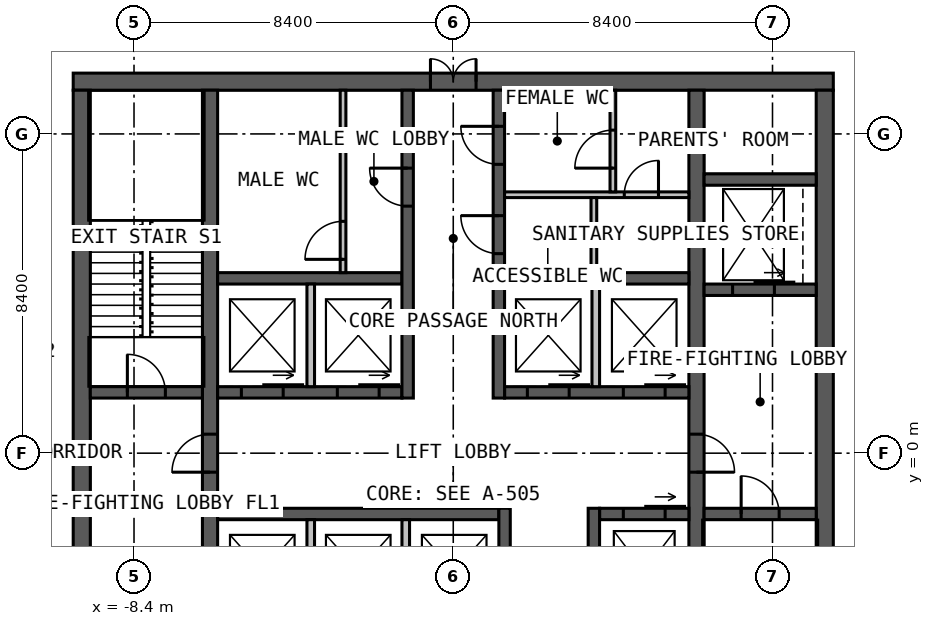
"""IFC4 building model, lengths in metres.
Left out: names, types, materials, properties, quantities, classifications, styles, units other than length and angle.
Written with IfcOpenShell. Run it as: python <this file> out.ifc"""

import sys

from ifc_helpers import new_model, si_unit, direction, frame, frame_2d, origin, place, context, subcontext, project, spatial, rectangle, extrude, element, fill, save


model = new_model("IFC4")
c1 = context("Model", 3, precision=1e-05, world=origin(), true_north=direction((0.0, 1.0)))
c2 = subcontext(c1, "Body", "Model", "MODEL_VIEW")
j1 = project(units=[si_unit("LENGTHUNIT", "METRE"), si_unit("PLANEANGLEUNIT", "RADIAN")], contexts=[c1])
p1 = place(None, origin())
s1 = spatial("IfcSite", under=j1, at=p1, CompositionType="ELEMENT")
p2 = place(p1, origin())
s2 = spatial("IfcBuilding", under=s1, at=p2, CompositionType="ELEMENT")
p3 = place(p2, frame((0.0, 0.0, 191.0)))
s3 = spatial("IfcBuildingStorey", under=s2, at=p3, CompositionType="ELEMENT", Elevation=191.0)
p4 = place(p3, frame((-10.0, 9.775, 0.0), z_axis=(0.0, 0.0, 1.0), x_axis=(1.0, 0.0, 0.0)))
e1 = element("IfcWall", 1, at=p4, inside=s3, PredefinedType="SOLIDWALL", context=c2, shape_type="SweptSolid", body=[
    extrude(rectangle(XDim=20.0, YDim=0.45, at=frame_2d((10.0, 0.0))), origin(), (0.0, 0.0, 1.0), 4.0),
])
p5 = place(p4, frame((9.4, 0.0, 0.0)))
e2 = element("IfcOpeningElement", 2, at=p5, cuts=e1, PredefinedType="OPENING", context=c2, shape_type="SweptSolid", body=[
    extrude(rectangle(XDim=1.2, YDim=2.2, at=frame_2d((0.6, 1.1))), frame((0.0, 0.235, 0.0), z_axis=(0.0, -1.0, 0.0), x_axis=(1.0, 0.0, 0.0)), (0.0, 0.0, 1.0), 0.47),
])
for number, where, z_axis, x_axis in (
    (3, (9.775, -9.55, 0.0), (0.0, 0.0, 1.0), (0.0, 1.0, 0.0)),
    (4, (-9.775, 9.55, 0.0), (0.0, 0.0, 1.0), (0.0, -1.0, 0.0)),
):
    element("IfcWall", number, at=place(p3, frame(where, z_axis=z_axis, x_axis=x_axis)), inside=s3, PredefinedType="SOLIDWALL", context=c2, shape_type="SweptSolid", body=[
        extrude(rectangle(XDim=19.1, YDim=0.45, at=frame_2d((9.55, 0.0))), origin(), (0.0, 0.0, 1.0), 4.0),
    ])
p6 = place(p3, frame((-6.4, -9.55, 0.0), z_axis=(0.0, 0.0, 1.0), x_axis=(0.0, 1.0, 0.0)))
e5 = element("IfcWall", 5, at=p6, inside=s3, PredefinedType="SOLIDWALL", context=c2, shape_type="SweptSolid", body=[
    extrude(rectangle(XDim=19.1, YDim=0.4, at=frame_2d((9.55, 0.0))), origin(), (0.0, 0.0, 1.0), 4.0),
])
p7 = place(p6, frame((9.05, 0.0, 0.0)))
e6 = element("IfcOpeningElement", 6, at=p7, cuts=e5, PredefinedType="OPENING", context=c2, shape_type="SweptSolid", body=[
    extrude(rectangle(XDim=1.0, YDim=2.2, at=frame_2d((0.5, 1.1))), frame((0.0, 0.21, 0.0), z_axis=(0.0, -1.0, 0.0), x_axis=(1.0, 0.0, 0.0)), (0.0, 0.0, 1.0), 0.42),
])
p8 = place(p3, frame((6.4, 9.55, 0.0), z_axis=(0.0, 0.0, 1.0), x_axis=(0.0, -1.0, 0.0)))
e7 = element("IfcWall", 7, at=p8, inside=s3, PredefinedType="SOLIDWALL", context=c2, shape_type="SweptSolid", body=[
    extrude(rectangle(XDim=19.1, YDim=0.4, at=frame_2d((9.55, 0.0))), origin(), (0.0, 0.0, 1.0), 4.0),
])
p9 = place(p8, frame((9.05, 0.0, 0.0)))
e8 = element("IfcOpeningElement", 8, at=p9, cuts=e7, PredefinedType="OPENING", context=c2, shape_type="SweptSolid", body=[
    extrude(rectangle(XDim=1.0, YDim=2.2, at=frame_2d((0.5, 1.1))), frame((0.0, 0.21, 0.0), z_axis=(0.0, -1.0, 0.0), x_axis=(1.0, 0.0, 0.0)), (0.0, 0.0, 1.0), 0.42),
])
p10 = place(p3, frame((-6.2, 1.6, 0.0), z_axis=(0.0, 0.0, 1.0), x_axis=(1.0, 0.0, 0.0)))
e9 = element("IfcWall", 9, at=p10, inside=s3, PredefinedType="SOLIDWALL", context=c2, shape_type="SweptSolid", body=[
    extrude(rectangle(XDim=4.85, YDim=0.3, at=frame_2d((2.425, 0.0))), origin(), (0.0, 0.0, 1.0), 4.0),
])
p11 = place(p10, frame((0.625, 0.0, 0.0)))
e10 = element("IfcOpeningElement", 10, at=p11, cuts=e9, PredefinedType="OPENING", context=c2, shape_type="SweptSolid", body=[
    extrude(rectangle(XDim=1.1, YDim=2.2, at=frame_2d((0.55, 1.1))), frame((0.0, 0.16, 0.0), z_axis=(0.0, -1.0, 0.0), x_axis=(1.0, 0.0, 0.0)), (0.0, 0.0, 1.0), 0.32),
])
p12 = place(p10, frame((3.15, 0.0, 0.0)))
e11 = element("IfcOpeningElement", 11, at=p12, cuts=e9, PredefinedType="OPENING", context=c2, shape_type="SweptSolid", body=[
    extrude(rectangle(XDim=1.1, YDim=2.2, at=frame_2d((0.55, 1.1))), frame((0.0, 0.16, 0.0), z_axis=(0.0, -1.0, 0.0), x_axis=(1.0, 0.0, 0.0)), (0.0, 0.0, 1.0), 0.32),
])
p13 = place(p3, frame((1.35, 1.6, 0.0), z_axis=(0.0, 0.0, 1.0), x_axis=(1.0, 0.0, 0.0)))
e12 = element("IfcWall", 12, at=p13, inside=s3, PredefinedType="SOLIDWALL", context=c2, shape_type="SweptSolid", body=[
    extrude(rectangle(XDim=4.85, YDim=0.3, at=frame_2d((2.425, 0.0))), origin(), (0.0, 0.0, 1.0), 4.0),
])
p14 = place(p13, frame((0.6, 0.0, 0.0)))
e13 = element("IfcOpeningElement", 13, at=p14, cuts=e12, PredefinedType="OPENING", context=c2, shape_type="SweptSolid", body=[
    extrude(rectangle(XDim=1.1, YDim=2.2, at=frame_2d((0.55, 1.1))), frame((0.0, 0.16, 0.0), z_axis=(0.0, -1.0, 0.0), x_axis=(1.0, 0.0, 0.0)), (0.0, 0.0, 1.0), 0.32),
])
p15 = place(p13, frame((3.125, 0.0, 0.0)))
e14 = element("IfcOpeningElement", 14, at=p15, cuts=e12, PredefinedType="OPENING", context=c2, shape_type="SweptSolid", body=[
    extrude(rectangle(XDim=1.1, YDim=2.2, at=frame_2d((0.55, 1.1))), frame((0.0, 0.16, 0.0), z_axis=(0.0, -1.0, 0.0), x_axis=(1.0, 0.0, 0.0)), (0.0, 0.0, 1.0), 0.32),
])
for number, where, z_axis, x_axis in (
    (15, (-6.2, 4.6, 0.0), (0.0, 0.0, 1.0), (1.0, 0.0, 0.0)),
    (16, (1.35, 4.6, 0.0), (0.0, 0.0, 1.0), (1.0, 0.0, 0.0)),
):
    element("IfcWall", number, at=place(p3, frame(where, z_axis=z_axis, x_axis=x_axis)), inside=s3, PredefinedType="SOLIDWALL", context=c2, shape_type="SweptSolid", body=[
        extrude(rectangle(XDim=4.85, YDim=0.3, at=frame_2d((2.425, 0.0))), origin(), (0.0, 0.0, 1.0), 4.0),
    ])
p16 = place(p3, frame((-1.2, 1.45, 0.0), z_axis=(0.0, 0.0, 1.0), x_axis=(0.0, 1.0, 0.0)))
e17 = element("IfcWall", 17, at=p16, inside=s3, PredefinedType="SOLIDWALL", context=c2, shape_type="SweptSolid", body=[
    extrude(rectangle(XDim=8.1, YDim=0.3, at=frame_2d((4.05, 0.0))), origin(), (0.0, 0.0, 1.0), 4.0),
])
p17 = place(p16, frame((5.05, 0.0, 0.0)))
e18 = element("IfcOpeningElement", 18, at=p17, cuts=e17, PredefinedType="OPENING", context=c2, shape_type="SweptSolid", body=[
    extrude(rectangle(XDim=1.0, YDim=2.2, at=frame_2d((0.5, 1.1))), frame((0.0, 0.16, 0.0), z_axis=(0.0, -1.0, 0.0), x_axis=(1.0, 0.0, 0.0)), (0.0, 0.0, 1.0), 0.32),
])
p18 = place(p3, frame((1.2, 1.45, 0.0), z_axis=(0.0, 0.0, 1.0), x_axis=(0.0, 1.0, 0.0)))
e19 = element("IfcWall", 19, at=p18, inside=s3, PredefinedType="SOLIDWALL", context=c2, shape_type="SweptSolid", body=[
    extrude(rectangle(XDim=8.1, YDim=0.3, at=frame_2d((4.05, 0.0))), origin(), (0.0, 0.0, 1.0), 4.0),
])
p19 = place(p18, frame((3.8, 0.0, 0.0)))
e20 = element("IfcOpeningElement", 20, at=p19, cuts=e19, PredefinedType="OPENING", context=c2, shape_type="SweptSolid", body=[
    extrude(rectangle(XDim=1.0, YDim=2.2, at=frame_2d((0.5, 1.1))), frame((0.0, 0.16, 0.0), z_axis=(0.0, -1.0, 0.0), x_axis=(1.0, 0.0, 0.0)), (0.0, 0.0, 1.0), 0.32),
])
p20 = place(p18, frame((6.15, 0.0, 0.0)))
e21 = element("IfcOpeningElement", 21, at=p20, cuts=e19, PredefinedType="OPENING", context=c2, shape_type="SweptSolid", body=[
    extrude(rectangle(XDim=1.0, YDim=2.2, at=frame_2d((0.5, 1.1))), frame((0.0, 0.16, 0.0), z_axis=(0.0, -1.0, 0.0), x_axis=(1.0, 0.0, 0.0)), (0.0, 0.0, 1.0), 0.32),
])
p21 = place(p3, frame((-6.2, -1.6, 0.0), z_axis=(0.0, 0.0, 1.0), x_axis=(1.0, 0.0, 0.0)))
e22 = element("IfcWall", 22, at=p21, inside=s3, PredefinedType="SOLIDWALL", context=c2, shape_type="SweptSolid", body=[
    extrude(rectangle(XDim=7.4, YDim=0.3, at=frame_2d((3.7, 0.0))), origin(), (0.0, 0.0, 1.0), 4.0),
])
p22 = place(p3, frame((3.85, -1.6, 0.0), z_axis=(0.0, 0.0, 1.0), x_axis=(1.0, 0.0, 0.0)))
e23 = element("IfcWall", 23, at=p22, inside=s3, PredefinedType="SOLIDWALL", context=c2, shape_type="SweptSolid", body=[
    extrude(rectangle(XDim=2.35, YDim=0.3, at=frame_2d((1.175, 0.0))), origin(), (0.0, 0.0, 1.0), 4.0),
])
p23 = place(p22, frame((0.625, 0.0, 0.0)))
e24 = element("IfcOpeningElement", 24, at=p23, cuts=e23, PredefinedType="OPENING", context=c2, shape_type="SweptSolid", body=[
    extrude(rectangle(XDim=1.1, YDim=2.2, at=frame_2d((0.55, 1.1))), frame((0.0, 0.16, 0.0), z_axis=(0.0, -1.0, 0.0), x_axis=(1.0, 0.0, 0.0)), (0.0, 0.0, 1.0), 0.32),
])
p24 = place(p3, frame((1.35, -1.45, 0.0), z_axis=(0.0, 0.0, 1.0), x_axis=(0.0, -1.0, 0.0)))
e25 = element("IfcWall", 25, at=p24, inside=s3, PredefinedType="SOLIDWALL", context=c2, shape_type="SweptSolid", body=[
    extrude(rectangle(XDim=8.1, YDim=0.3, at=frame_2d((4.05, 0.0))), origin(), (0.0, 0.0, 1.0), 4.0),
])
p25 = place(p24, frame((5.975, 0.0, 0.0)))
e26 = element("IfcOpeningElement", 26, at=p25, cuts=e25, PredefinedType="OPENING", context=c2, shape_type="SweptSolid", body=[
    extrude(rectangle(XDim=1.0, YDim=2.2, at=frame_2d((0.5, 1.1))), frame((0.0, 0.16, 0.0), z_axis=(0.0, -1.0, 0.0), x_axis=(1.0, 0.0, 0.0)), (0.0, 0.0, 1.0), 0.32),
])
p26 = place(p24, frame((3.525, 0.0, 0.0)))
e27 = element("IfcOpeningElement", 27, at=p26, cuts=e25, PredefinedType="OPENING", context=c2, shape_type="SweptSolid", body=[
    extrude(rectangle(XDim=0.9, YDim=2.2, at=frame_2d((0.45, 1.1))), frame((0.0, 0.16, 0.0), z_axis=(0.0, -1.0, 0.0), x_axis=(1.0, 0.0, 0.0)), (0.0, 0.0, 1.0), 0.32),
])
p27 = place(p3, frame((3.7, -1.45, 0.0), z_axis=(0.0, 0.0, 1.0), x_axis=(0.0, -1.0, 0.0)))
e28 = element("IfcWall", 28, at=p27, inside=s3, PredefinedType="SOLIDWALL", context=c2, shape_type="SweptSolid", body=[
    extrude(rectangle(XDim=8.1, YDim=0.3, at=frame_2d((4.05, 0.0))), origin(), (0.0, 0.0, 1.0), 4.0),
])
p28 = place(p27, frame((5.1, 0.0, 0.0)))
e29 = element("IfcOpeningElement", 29, at=p28, cuts=e28, PredefinedType="OPENING", context=c2, shape_type="SweptSolid", body=[
    extrude(rectangle(XDim=0.9, YDim=2.2, at=frame_2d((0.45, 1.1))), frame((0.0, 0.16, 0.0), z_axis=(0.0, -1.0, 0.0), x_axis=(1.0, 0.0, 0.0)), (0.0, 0.0, 1.0), 0.32),
])
p29 = place(p3, frame((-9.55, 1.6, 0.0), z_axis=(0.0, 0.0, 1.0), x_axis=(1.0, 0.0, 0.0)))
e30 = element("IfcWall", 30, at=p29, inside=s3, PredefinedType="SOLIDWALL", context=c2, shape_type="SweptSolid", body=[
    extrude(rectangle(XDim=2.95, YDim=0.3, at=frame_2d((1.475, 0.0))), origin(), (0.0, 0.0, 1.0), 4.0),
])
p30 = place(p29, frame((0.975, 0.0, 0.0)))
e31 = element("IfcOpeningElement", 31, at=p30, cuts=e30, PredefinedType="OPENING", context=c2, shape_type="SweptSolid", body=[
    extrude(rectangle(XDim=1.0, YDim=2.2, at=frame_2d((0.5, 1.1))), frame((0.0, 0.16, 0.0), z_axis=(0.0, -1.0, 0.0), x_axis=(1.0, 0.0, 0.0)), (0.0, 0.0, 1.0), 0.32),
])
p31 = place(p3, frame((6.6, -1.6, 0.0), z_axis=(0.0, 0.0, 1.0), x_axis=(1.0, 0.0, 0.0)))
e32 = element("IfcWall", 32, at=p31, inside=s3, PredefinedType="SOLIDWALL", context=c2, shape_type="SweptSolid", body=[
    extrude(rectangle(XDim=2.95, YDim=0.3, at=frame_2d((1.475, 0.0))), origin(), (0.0, 0.0, 1.0), 4.0),
])
p32 = place(p31, frame((0.975, 0.0, 0.0)))
e33 = element("IfcOpeningElement", 33, at=p32, cuts=e32, PredefinedType="OPENING", context=c2, shape_type="SweptSolid", body=[
    extrude(rectangle(XDim=1.0, YDim=2.2, at=frame_2d((0.5, 1.1))), frame((0.0, 0.16, 0.0), z_axis=(0.0, -1.0, 0.0), x_axis=(1.0, 0.0, 0.0)), (0.0, 0.0, 1.0), 0.32),
])
p33 = place(p3, frame((6.6, 4.3, 0.0), z_axis=(0.0, 0.0, 1.0), x_axis=(1.0, 0.0, 0.0)))
e34 = element("IfcWall", 34, at=p33, inside=s3, PredefinedType="SOLIDWALL", context=c2, shape_type="SweptSolid", body=[
    extrude(rectangle(XDim=2.95, YDim=0.3, at=frame_2d((1.475, 0.0))), origin(), (0.0, 0.0, 1.0), 4.0),
])
p34 = place(p33, frame((0.75, 0.0, 0.0)))
e35 = element("IfcOpeningElement", 35, at=p34, cuts=e34, PredefinedType="OPENING", context=c2, shape_type="SweptSolid", body=[
    extrude(rectangle(XDim=1.1, YDim=2.2, at=frame_2d((0.55, 1.1))), frame((0.0, 0.16, 0.0), z_axis=(0.0, -1.0, 0.0), x_axis=(1.0, 0.0, 0.0)), (0.0, 0.0, 1.0), 0.32),
])
p35 = place(p3, frame((6.6, 7.2, 0.0), z_axis=(0.0, 0.0, 1.0), x_axis=(1.0, 0.0, 0.0)))
e36 = element("IfcWall", 36, at=p35, inside=s3, PredefinedType="SOLIDWALL", context=c2, shape_type="SweptSolid", body=[
    extrude(rectangle(XDim=2.95, YDim=0.3, at=frame_2d((1.475, 0.0))), origin(), (0.0, 0.0, 1.0), 4.0),
])
for number, where, z_axis, x_axis in (
    (37, (-3.75, 1.75, 0.0), (0.0, 0.0, 1.0), (0.0, 1.0, 0.0)),
    (38, (3.75, 1.75, 0.0), (0.0, 0.0, 1.0), (0.0, 1.0, 0.0)),
    (39, (-3.75, -1.75, 0.0), (0.0, 0.0, 1.0), (0.0, -1.0, 0.0)),
    (40, (-1.25, -1.75, 0.0), (0.0, 0.0, 1.0), (0.0, -1.0, 0.0)),
):
    element("IfcWall", number, at=place(p3, frame(where, z_axis=z_axis, x_axis=x_axis)), inside=s3, PredefinedType="SOLIDWALL", context=c2, shape_type="SweptSolid", body=[
        extrude(rectangle(XDim=2.7, YDim=0.2, at=frame_2d((1.35, 0.0))), origin(), (0.0, 0.0, 1.0), 3.75),
    ])
p36 = place(p3, frame((1.35, 6.8, 0.0), z_axis=(0.0, 0.0, 1.0), x_axis=(1.0, 0.0, 0.0)))
e41 = element("IfcWall", 41, at=p36, inside=s3, PredefinedType="PARTITIONING", context=c2, shape_type="SweptSolid", body=[
    extrude(rectangle(XDim=4.85, YDim=0.15, at=frame_2d((2.425, 0.0))), origin(), (0.0, 0.0, 1.0), 3.75),
])
p37 = place(p36, frame((3.15, 0.0, 0.0)))
e42 = element("IfcOpeningElement", 42, at=p37, cuts=e41, PredefinedType="OPENING", context=c2, shape_type="SweptSolid", body=[
    extrude(rectangle(XDim=0.9, YDim=2.2, at=frame_2d((0.45, 1.1))), frame((0.0, 0.085, 0.0), z_axis=(0.0, -1.0, 0.0), x_axis=(1.0, 0.0, 0.0)), (0.0, 0.0, 1.0), 0.17),
])
p38 = place(p3, frame((3.7, 4.75, 0.0), z_axis=(0.0, 0.0, 1.0), x_axis=(0.0, 1.0, 0.0)))
e43 = element("IfcWall", 43, at=p38, inside=s3, PredefinedType="PARTITIONING", context=c2, shape_type="SweptSolid", body=[
    extrude(rectangle(XDim=1.975, YDim=0.15, at=frame_2d((0.988, 0.0))), origin(), (0.0, 0.0, 1.0), 3.75),
])
p39 = place(p3, frame((4.2, 6.875, 0.0), z_axis=(0.0, 0.0, 1.0), x_axis=(0.0, 1.0, 0.0)))
e44 = element("IfcWall", 44, at=p39, inside=s3, PredefinedType="PARTITIONING", context=c2, shape_type="SweptSolid", body=[
    extrude(rectangle(XDim=2.675, YDim=0.15, at=frame_2d((1.337, 0.0))), origin(), (0.0, 0.0, 1.0), 3.75),
])
p40 = place(p39, frame((0.625, 0.0, 0.0)))
e45 = element("IfcOpeningElement", 45, at=p40, cuts=e44, PredefinedType="OPENING", context=c2, shape_type="SweptSolid", body=[
    extrude(rectangle(XDim=1.0, YDim=2.2, at=frame_2d((0.5, 1.1))), frame((0.0, 0.085, 0.0), z_axis=(0.0, -1.0, 0.0), x_axis=(1.0, 0.0, 0.0)), (0.0, 0.0, 1.0), 0.17),
])
p41 = place(p3, frame((-2.9, 4.75, 0.0), z_axis=(0.0, 0.0, 1.0), x_axis=(0.0, 1.0, 0.0)))
e46 = element("IfcWall", 46, at=p41, inside=s3, PredefinedType="PARTITIONING", context=c2, shape_type="SweptSolid", body=[
    extrude(rectangle(XDim=4.8, YDim=0.15, at=frame_2d((2.4, 0.0))), origin(), (0.0, 0.0, 1.0), 3.75),
])
p42 = place(p41, frame((0.35, 0.0, 0.0)))
e47 = element("IfcOpeningElement", 47, at=p42, cuts=e46, PredefinedType="OPENING", context=c2, shape_type="SweptSolid", body=[
    extrude(rectangle(XDim=1.0, YDim=2.2, at=frame_2d((0.5, 1.1))), frame((0.0, 0.085, 0.0), z_axis=(0.0, -1.0, 0.0), x_axis=(1.0, 0.0, 0.0)), (0.0, 0.0, 1.0), 0.17),
])
p43 = place(p5, origin())
e48 = element("IfcDoor", 48, at=p43, inside=s3, OperationType="DOUBLE_DOOR_SINGLE_SWING", PredefinedType="DOOR", context=c2, shape_type="SweptSolid", body=[
    extrude(rectangle(XDim=1.2, YDim=2.2, at=frame_2d((0.6, 1.1))), frame((0.0, 0.025, 0.0), z_axis=(0.0, -1.0, 0.0), x_axis=(1.0, 0.0, 0.0)), (0.0, 0.0, 1.0), 0.05),
])
fill(e2, e48)
p44 = place(p7, origin())
e49 = element("IfcDoor", 49, at=p44, inside=s3, OperationType="SINGLE_SWING_LEFT", PredefinedType="DOOR", context=c2, shape_type="SweptSolid", body=[
    extrude(rectangle(XDim=1.0, YDim=2.2, at=frame_2d((0.5, 1.1))), frame((0.0, 0.025, 0.0), z_axis=(0.0, -1.0, 0.0), x_axis=(1.0, 0.0, 0.0)), (0.0, 0.0, 1.0), 0.05),
])
fill(e6, e49)
p45 = place(p9, origin())
e50 = element("IfcDoor", 50, at=p45, inside=s3, OperationType="SINGLE_SWING_RIGHT", PredefinedType="DOOR", context=c2, shape_type="SweptSolid", body=[
    extrude(rectangle(XDim=1.0, YDim=2.2, at=frame_2d((0.5, 1.1))), frame((0.0, 0.025, 0.0), z_axis=(0.0, -1.0, 0.0), x_axis=(1.0, 0.0, 0.0)), (0.0, 0.0, 1.0), 0.05),
])
fill(e8, e50)
p46 = place(p30, origin())
e51 = element("IfcDoor", 51, at=p46, inside=s3, OperationType="SINGLE_SWING_LEFT", PredefinedType="DOOR", context=c2, shape_type="SweptSolid", body=[
    extrude(rectangle(XDim=1.0, YDim=2.2, at=frame_2d((0.5, 1.1))), frame((0.0, 0.025, 0.0), z_axis=(0.0, -1.0, 0.0), x_axis=(1.0, 0.0, 0.0)), (0.0, 0.0, 1.0), 0.05),
])
fill(e31, e51)
p47 = place(p32, origin())
e52 = element("IfcDoor", 52, at=p47, inside=s3, OperationType="SINGLE_SWING_LEFT", PredefinedType="DOOR", context=c2, shape_type="SweptSolid", body=[
    extrude(rectangle(XDim=1.0, YDim=2.2, at=frame_2d((0.5, 1.1))), frame((0.0, 0.025, 0.0), z_axis=(0.0, -1.0, 0.0), x_axis=(1.0, 0.0, 0.0)), (0.0, 0.0, 1.0), 0.05),
])
fill(e33, e52)
p48 = place(p17, origin())
e53 = element("IfcDoor", 53, at=p48, inside=s3, OperationType="SINGLE_SWING_RIGHT", PredefinedType="DOOR", context=c2, shape_type="SweptSolid", body=[
    extrude(rectangle(XDim=1.0, YDim=2.2, at=frame_2d((0.5, 1.1))), frame((0.0, 0.025, 0.0), z_axis=(0.0, -1.0, 0.0), x_axis=(1.0, 0.0, 0.0)), (0.0, 0.0, 1.0), 0.05),
])
fill(e18, e53)
p49 = place(p19, origin())
e54 = element("IfcDoor", 54, at=p49, inside=s3, OperationType="SINGLE_SWING_RIGHT", PredefinedType="DOOR", context=c2, shape_type="SweptSolid", body=[
    extrude(rectangle(XDim=1.0, YDim=2.2, at=frame_2d((0.5, 1.1))), frame((0.0, 0.025, 0.0), z_axis=(0.0, -1.0, 0.0), x_axis=(1.0, 0.0, 0.0)), (0.0, 0.0, 1.0), 0.05),
])
fill(e20, e54)
p50 = place(p20, origin())
e55 = element("IfcDoor", 55, at=p50, inside=s3, OperationType="SINGLE_SWING_RIGHT", PredefinedType="DOOR", context=c2, shape_type="SweptSolid", body=[
    extrude(rectangle(XDim=1.0, YDim=2.2, at=frame_2d((0.5, 1.1))), frame((0.0, 0.025, 0.0), z_axis=(0.0, -1.0, 0.0), x_axis=(1.0, 0.0, 0.0)), (0.0, 0.0, 1.0), 0.05),
])
fill(e21, e55)
p51 = place(p37, origin())
e56 = element("IfcDoor", 56, at=p51, inside=s3, OperationType="SINGLE_SWING_RIGHT", PredefinedType="DOOR", context=c2, shape_type="SweptSolid", body=[
    extrude(rectangle(XDim=0.9, YDim=2.2, at=frame_2d((0.45, 1.1))), frame((0.0, 0.025, 0.0), z_axis=(0.0, -1.0, 0.0), x_axis=(1.0, 0.0, 0.0)), (0.0, 0.0, 1.0), 0.05),
])
fill(e42, e56)
p52 = place(p40, origin())
e57 = element("IfcDoor", 57, at=p52, inside=s3, OperationType="SINGLE_SWING_LEFT", PredefinedType="DOOR", context=c2, shape_type="SweptSolid", body=[
    extrude(rectangle(XDim=1.0, YDim=2.2, at=frame_2d((0.5, 1.1))), frame((0.0, 0.025, 0.0), z_axis=(0.0, -1.0, 0.0), x_axis=(1.0, 0.0, 0.0)), (0.0, 0.0, 1.0), 0.05),
])
fill(e45, e57)
p53 = place(p42, origin())
e58 = element("IfcDoor", 58, at=p53, inside=s3, OperationType="SINGLE_SWING_LEFT", PredefinedType="DOOR", context=c2, shape_type="SweptSolid", body=[
    extrude(rectangle(XDim=1.0, YDim=2.2, at=frame_2d((0.5, 1.1))), frame((0.0, 0.025, 0.0), z_axis=(0.0, -1.0, 0.0), x_axis=(1.0, 0.0, 0.0)), (0.0, 0.0, 1.0), 0.05),
])
fill(e47, e58)
p54 = place(p11, origin())
e59 = element("IfcDoor", 59, at=p54, inside=s3, OperationType="SLIDING_TO_LEFT", PredefinedType="DOOR", context=c2, shape_type="SweptSolid", body=[
    extrude(rectangle(XDim=1.1, YDim=2.2, at=frame_2d((0.55, 1.1))), frame((0.0, 0.025, 0.0), z_axis=(0.0, -1.0, 0.0), x_axis=(1.0, 0.0, 0.0)), (0.0, 0.0, 1.0), 0.05),
])
fill(e10, e59)
p55 = place(p12, origin())
e60 = element("IfcDoor", 60, at=p55, inside=s3, OperationType="SLIDING_TO_LEFT", PredefinedType="DOOR", context=c2, shape_type="SweptSolid", body=[
    extrude(rectangle(XDim=1.1, YDim=2.2, at=frame_2d((0.55, 1.1))), frame((0.0, 0.025, 0.0), z_axis=(0.0, -1.0, 0.0), x_axis=(1.0, 0.0, 0.0)), (0.0, 0.0, 1.0), 0.05),
])
fill(e11, e60)
p56 = place(p14, origin())
e61 = element("IfcDoor", 61, at=p56, inside=s3, OperationType="SLIDING_TO_LEFT", PredefinedType="DOOR", context=c2, shape_type="SweptSolid", body=[
    extrude(rectangle(XDim=1.1, YDim=2.2, at=frame_2d((0.55, 1.1))), frame((0.0, 0.025, 0.0), z_axis=(0.0, -1.0, 0.0), x_axis=(1.0, 0.0, 0.0)), (0.0, 0.0, 1.0), 0.05),
])
fill(e13, e61)
p57 = place(p15, origin())
e62 = element("IfcDoor", 62, at=p57, inside=s3, OperationType="SLIDING_TO_LEFT", PredefinedType="DOOR", context=c2, shape_type="SweptSolid", body=[
    extrude(rectangle(XDim=1.1, YDim=2.2, at=frame_2d((0.55, 1.1))), frame((0.0, 0.025, 0.0), z_axis=(0.0, -1.0, 0.0), x_axis=(1.0, 0.0, 0.0)), (0.0, 0.0, 1.0), 0.05),
])
fill(e14, e62)
p58 = place(p23, origin())
e63 = element("IfcDoor", 63, at=p58, inside=s3, OperationType="SLIDING_TO_LEFT", PredefinedType="DOOR", context=c2, shape_type="SweptSolid", body=[
    extrude(rectangle(XDim=1.1, YDim=2.2, at=frame_2d((0.55, 1.1))), frame((0.0, 0.025, 0.0), z_axis=(0.0, -1.0, 0.0), x_axis=(1.0, 0.0, 0.0)), (0.0, 0.0, 1.0), 0.05),
])
fill(e24, e63)
p59 = place(p34, origin())
e64 = element("IfcDoor", 64, at=p59, inside=s3, OperationType="SLIDING_TO_LEFT", PredefinedType="DOOR", context=c2, shape_type="SweptSolid", body=[
    extrude(rectangle(XDim=1.1, YDim=2.2, at=frame_2d((0.55, 1.1))), frame((0.0, 0.025, 0.0), z_axis=(0.0, -1.0, 0.0), x_axis=(1.0, 0.0, 0.0)), (0.0, 0.0, 1.0), 0.05),
])
fill(e35, e64)
save(model, sys.argv[1])
